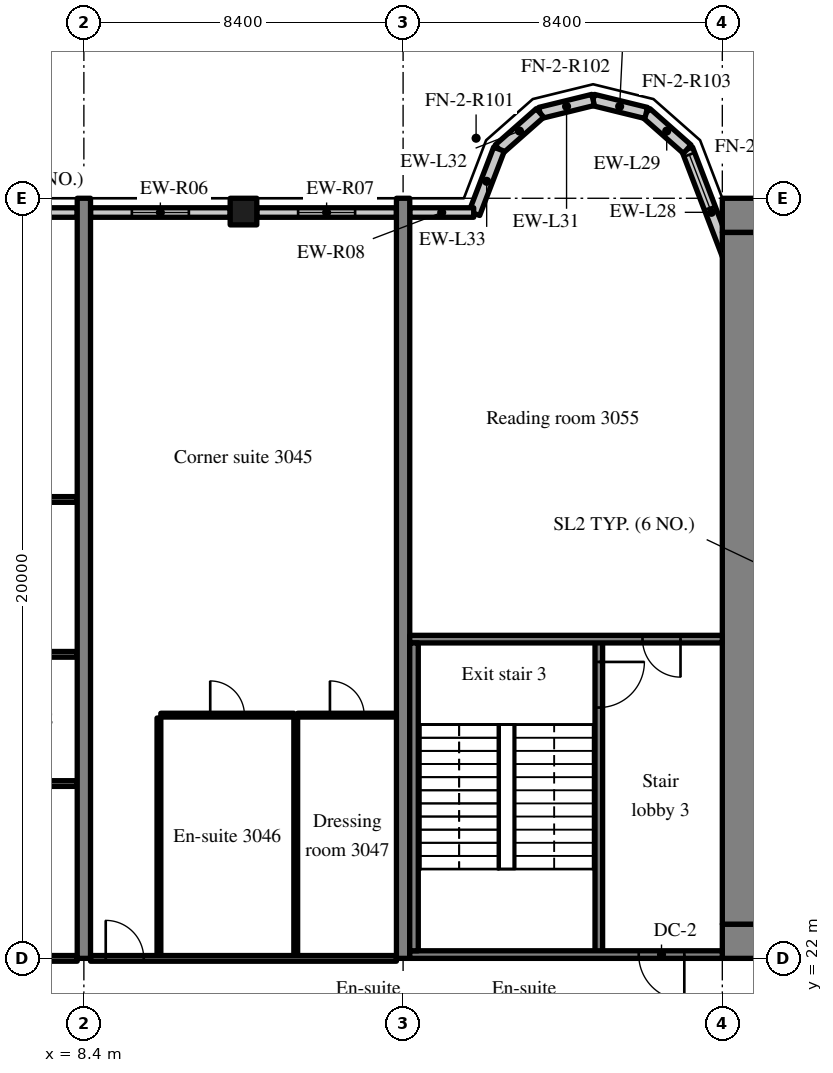
"""IFC4 building model, lengths in metres.
Left out: names, types, materials, properties, quantities, classifications, styles, units other than length and angle.
Written with IfcOpenShell. Run it as: python <this file> out.ifc"""

import sys

from ifc_helpers import new_model, si_unit, direction, frame, frame_2d, origin, origin_2d, place, context, subcontext, project, spatial, rectangle, extrude, source, transform, mapped, element, fill, save


model = new_model("IFC4")
c1 = context("Model", 3, precision=1e-05, world=origin(), true_north=direction((0.0, 1.0)))
c2 = subcontext(c1, "Body", "Model", "MODEL_VIEW")
j1 = project(units=[si_unit("LENGTHUNIT", "METRE"), si_unit("PLANEANGLEUNIT", "RADIAN")], contexts=[c1])
p1 = place(None, origin())
s1 = spatial("IfcSite", under=j1, at=p1, CompositionType="ELEMENT")
p2 = place(p1, origin())
s2 = spatial("IfcBuilding", under=s1, at=p2, CompositionType="ELEMENT")
p3 = place(p2, frame((0.0, 0.0, 125.6)))
s3 = spatial("IfcBuildingStorey", under=s2, at=p3, CompositionType="ELEMENT", Elevation=125.6)
m1 = source(origin(), c2, "Body", "SweptSolid", [
    extrude(rectangle(XDim=50.4, YDim=0.9, at=frame_2d((25.2, 0.0))), origin(), (0.0, 0.0, 1.0), 3.52),
])
p4 = place(p3, frame((25.2, 22.45, 0.0), z_axis=(0.0, 0.0, 1.0), x_axis=(1.0, 0.0, 0.0)))
e1 = element("IfcWall", 1, at=p4, inside=s3, PredefinedType="SHEAR", context=c2, shape_type="MappedRepresentation", body=[
    mapped(m1, transform((0.0, 0.0, 0.0), scale=1.0)),
])
m2 = source(origin(), c2, "Body", "SweptSolid", [
    extrude(rectangle(XDim=1.8, YDim=2.1, at=frame_2d((0.9, 1.05))), frame((0.0, 0.46, 0.0), z_axis=(0.0, -1.0, 0.0), x_axis=(1.0, 0.0, 0.0)), (0.0, 0.0, 1.0), 0.92),
])
p5 = place(p4, frame((15.9, 0.0, 0.0)))
e2 = element("IfcOpeningElement", 2, at=p5, cuts=e1, PredefinedType="OPENING", context=c2, shape_type="MappedRepresentation", body=[
    mapped(m2, transform((0.0, 0.0, 0.0), scale=1.0)),
])
m3 = source(origin(), c2, "Body", "SweptSolid", [
    extrude(rectangle(XDim=1.2, YDim=2.1, at=frame_2d((0.6, 1.05))), frame((0.0, 0.46, 0.0), z_axis=(0.0, -1.0, 0.0), x_axis=(1.0, 0.0, 0.0)), (0.0, 0.0, 1.0), 0.92),
])
p6 = place(p4, frame((26.975, 0.0, 0.0)))
e3 = element("IfcOpeningElement", 3, at=p6, cuts=e1, PredefinedType="OPENING", context=c2, shape_type="MappedRepresentation", body=[
    mapped(m3, transform((0.0, 0.0, 0.0), scale=1.0)),
])
m4 = source(origin(), c2, "Body", "SweptSolid", [
    extrude(rectangle(XDim=0.9, YDim=2.1, at=frame_2d((0.45, 1.05))), frame((0.0, 0.46, 0.0), z_axis=(0.0, -1.0, 0.0), x_axis=(1.0, 0.0, 0.0)), (0.0, 0.0, 1.0), 0.92),
])
p7 = place(p4, frame((33.75, 0.0, 0.0)))
e4 = element("IfcOpeningElement", 4, at=p7, cuts=e1, PredefinedType="OPENING", context=c2, shape_type="MappedRepresentation", body=[
    mapped(m4, transform((0.0, 0.0, 0.0), scale=1.0)),
])
p8 = place(p4, frame((30.75, 0.0, 0.0)))
e5 = element("IfcOpeningElement", 5, at=p8, cuts=e1, PredefinedType="OPENING", context=c2, shape_type="MappedRepresentation", body=[
    mapped(m4, transform((0.0, 0.0, 0.0), scale=1.0)),
])
p9 = place(p4, frame((38.275, 0.0, 0.0)))
e6 = element("IfcOpeningElement", 6, at=p9, cuts=e1, PredefinedType="OPENING", context=c2, shape_type="MappedRepresentation", body=[
    mapped(m4, transform((0.0, 0.0, 0.0), scale=1.0)),
])
p10 = place(p4, frame((6.45, 0.0, 0.0)))
e7 = element("IfcOpeningElement", 7, at=p10, cuts=e1, PredefinedType="OPENING", context=c2, shape_type="MappedRepresentation", body=[
    mapped(m3, transform((0.0, 0.0, 0.0), scale=1.0)),
])
p11 = place(p4, frame((47.775, 0.0, 0.0)))
e8 = element("IfcOpeningElement", 8, at=p11, cuts=e1, PredefinedType="OPENING", context=c2, shape_type="MappedRepresentation", body=[
    mapped(m3, transform((0.0, 0.0, 0.0), scale=1.0)),
])
p12 = place(p3, frame((25.2, 41.55, 0.0), z_axis=(0.0, 0.0, 1.0), x_axis=(1.0, 0.0, 0.0)))
e9 = element("IfcWall", 9, at=p12, inside=s3, PredefinedType="SHEAR", context=c2, shape_type="MappedRepresentation", body=[
    mapped(m1, transform((0.0, 0.0, 0.0), scale=1.0)),
])
m5 = source(origin(), c2, "Body", "SweptSolid", [
    extrude(rectangle(XDim=18.2, YDim=0.9, at=frame_2d((9.1, 0.0))), origin(), (0.0, 0.0, 1.0), 3.52),
])
p13 = place(p3, frame((25.65, 22.9, 0.0), z_axis=(0.0, 0.0, 1.0), x_axis=(0.0, 1.0, 0.0)))
e10 = element("IfcWall", 10, at=p13, inside=s3, PredefinedType="SHEAR", context=c2, shape_type="MappedRepresentation", body=[
    mapped(m5, transform((0.0, 0.0, 0.0), scale=1.0)),
])
m6 = source(origin(), c2, "Body", "SweptSolid", [
    extrude(rectangle(XDim=20.0, YDim=0.35, at=frame_2d((10.0, 0.0))), origin(), (0.0, 0.0, 1.0), 3.52),
])
for number, where, z_axis, x_axis in (
    (11, (8.4, 22.0, 0.0), (0.0, 0.0, 1.0), (0.0, 1.0, 0.0)),
    (12, (16.8, 22.0, 0.0), (0.0, 0.0, 1.0), (0.0, 1.0, 0.0)),
):
    element("IfcWall", number, at=place(p3, frame(where, z_axis=z_axis, x_axis=x_axis)), inside=s3, PredefinedType="SHEAR", context=c2, shape_type="MappedRepresentation", body=[
        mapped(m6, transform((0.0, 0.0, 0.0), scale=1.0)),
    ])
m7 = source(origin(), c2, "Body", "SweptSolid", [
    extrude(rectangle(XDim=0.7, YDim=0.7, at=origin_2d()), origin(), (0.0, 0.0, 1.0), 3.52),
])
p14 = place(p3, frame((12.6, 41.65, 0.0), z_axis=(0.0, 0.0, 1.0), x_axis=(1.0, 0.0, 0.0)))
e13 = element("IfcColumn", 13, at=p14, inside=s3, PredefinedType="COLUMN", context=c2, shape_type="MappedRepresentation", body=[
    mapped(m7, transform((0.0, 0.0, 0.0), scale=1.0)),
])
m8 = source(origin(), c2, "Body", "SweptSolid", [
    extrude(rectangle(XDim=3.559, YDim=0.3, at=frame_2d((1.78, 0.0))), origin(), (0.0, 0.0, 1.0), 3.52),
])
p15 = place(p3, frame((25.55, 39.969, 0.0), z_axis=(0.0, 0.0, 1.0), x_axis=(-0.35779745313, 0.933799219604, 0.0)))
e14 = element("IfcWall", 14, at=p15, inside=s3, PredefinedType="SOLIDWALL", context=c2, shape_type="MappedRepresentation", body=[
    mapped(m8, transform((0.0, 0.0, 0.0), scale=1.0)),
])
m9 = source(origin(), c2, "Body", "SweptSolid", [
    extrude(rectangle(XDim=1.5, YDim=2.0, at=frame_2d((0.75, 1.0))), frame((0.0, 0.16, 0.0), z_axis=(0.0, -1.0, 0.0), x_axis=(1.0, 0.0, 0.0)), (0.0, 0.0, 1.0), 0.32),
])
p16 = place(p15, frame((1.903, 0.0, 0.9)))
e15 = element("IfcOpeningElement", 15, at=p16, cuts=e14, PredefinedType="OPENING", context=c2, shape_type="MappedRepresentation", body=[
    mapped(m9, transform((0.0, 0.0, 0.0), scale=1.0)),
])
m10 = source(origin(), c2, "Body", "SweptSolid", [
    extrude(rectangle(XDim=1.44, YDim=0.3, at=frame_2d((0.72, 0.0))), origin(), (0.0, 0.0, 1.0), 3.52),
])
p17 = place(p3, frame((24.277, 43.292, 0.0), z_axis=(0.0, 0.0, 1.0), x_axis=(-0.749649827867, 0.661834673902, 0.0)))
e16 = element("IfcWall", 16, at=p17, inside=s3, PredefinedType="SOLIDWALL", context=c2, shape_type="MappedRepresentation", body=[
    mapped(m10, transform((0.0, 0.0, 0.0), scale=1.0)),
])
m11 = source(origin(), c2, "Body", "SweptSolid", [
    extrude(rectangle(XDim=1.438, YDim=0.3, at=frame_2d((0.719, 0.0))), origin(), (0.0, 0.0, 1.0), 3.52),
])
p18 = place(p3, frame((23.197, 44.245, 0.0), z_axis=(0.0, 0.0, 1.0), x_axis=(-0.971152283879, 0.238460146601, 0.0)))
e17 = element("IfcWall", 17, at=p18, inside=s3, PredefinedType="SOLIDWALL", context=c2, shape_type="MappedRepresentation", body=[
    mapped(m11, transform((0.0, 0.0, 0.0), scale=1.0)),
])
m12 = source(origin(), c2, "Body", "SweptSolid", [
    extrude(rectangle(XDim=1.439, YDim=0.3, at=frame_2d((0.719, 0.0))), origin(), (0.0, 0.0, 1.0), 3.52),
])
p19 = place(p3, frame((21.8, 44.588, 0.0), z_axis=(0.0, 0.0, 1.0), x_axis=(-0.971161932466, -0.238420848351, 0.0)))
e18 = element("IfcWall", 18, at=p19, inside=s3, PredefinedType="SOLIDWALL", context=c2, shape_type="MappedRepresentation", body=[
    mapped(m12, transform((0.0, 0.0, 0.0), scale=1.0)),
])
m13 = source(origin(), c2, "Body", "SweptSolid", [
    extrude(rectangle(XDim=1.44, YDim=0.3, at=frame_2d((0.72, 0.0))), origin(), (0.0, 0.0, 1.0), 3.52),
])
p20 = place(p3, frame((20.403, 44.245, 0.0), z_axis=(0.0, 0.0, 1.0), x_axis=(-0.74957555648, -0.661918790432, 0.0)))
e19 = element("IfcWall", 19, at=p20, inside=s3, PredefinedType="SOLIDWALL", context=c2, shape_type="MappedRepresentation", body=[
    mapped(m13, transform((0.0, 0.0, 0.0), scale=1.0)),
])
m14 = source(origin(), c2, "Body", "SweptSolid", [
    extrude(rectangle(XDim=1.812, YDim=0.3, at=frame_2d((0.906, 0.0))), origin(), (0.0, 0.0, 1.0), 3.52),
])
p21 = place(p3, frame((19.323, 43.292, 0.0), z_axis=(0.0, 0.0, 1.0), x_axis=(-0.357877270961, -0.93376863244, 0.0)))
e20 = element("IfcWall", 20, at=p21, inside=s3, PredefinedType="SOLIDWALL", context=c2, shape_type="MappedRepresentation", body=[
    mapped(m14, transform((0.0, 0.0, 0.0), scale=1.0)),
])
m15 = source(origin(), c2, "Body", "SweptSolid", [
    extrude(rectangle(XDim=4.07, YDim=0.25, at=frame_2d((2.035, 0.0))), origin(), (0.0, 0.0, 1.0), 2.82),
])
p22 = place(p3, frame((8.225, 41.625, 0.0), z_axis=(0.0, 0.0, 1.0), x_axis=(-1.0, 0.0, 0.0)))
e21 = element("IfcWall", 21, at=p22, inside=s3, PredefinedType="SOLIDWALL", context=c2, shape_type="MappedRepresentation", body=[
    mapped(m15, transform((0.0, 0.0, 0.0), scale=1.0)),
])
m16 = source(origin(), c2, "Body", "SweptSolid", [
    extrude(rectangle(XDim=1.5, YDim=1.5, at=frame_2d((0.75, 0.75))), frame((0.0, 0.135, 0.0), z_axis=(0.0, -1.0, 0.0), x_axis=(1.0, 0.0, 0.0)), (0.0, 0.0, 1.0), 0.27),
])
p23 = place(p22, frame((1.285, 0.0, 0.9)))
e22 = element("IfcOpeningElement", 22, at=p23, cuts=e21, PredefinedType="OPENING", context=c2, shape_type="MappedRepresentation", body=[
    mapped(m16, transform((0.0, 0.0, 0.0), scale=1.0)),
])
m17 = source(origin(), c2, "Body", "SweptSolid", [
    extrude(rectangle(XDim=3.675, YDim=0.25, at=frame_2d((1.837, 0.0))), origin(), (0.0, 0.0, 1.0), 2.82),
])
p24 = place(p3, frame((12.25, 41.625, 0.0), z_axis=(0.0, 0.0, 1.0), x_axis=(-1.0, 0.0, 0.0)))
e23 = element("IfcWall", 23, at=p24, inside=s3, PredefinedType="SOLIDWALL", context=c2, shape_type="MappedRepresentation", body=[
    mapped(m17, transform((0.0, 0.0, 0.0), scale=1.0)),
])
p25 = place(p24, frame((1.087, 0.0, 0.9)))
e24 = element("IfcOpeningElement", 24, at=p25, cuts=e23, PredefinedType="OPENING", context=c2, shape_type="MappedRepresentation", body=[
    mapped(m16, transform((0.0, 0.0, 0.0), scale=1.0)),
])
p26 = place(p3, frame((16.625, 41.625, 0.0), z_axis=(0.0, 0.0, 1.0), x_axis=(-1.0, 0.0, 0.0)))
e25 = element("IfcWall", 25, at=p26, inside=s3, PredefinedType="SOLIDWALL", context=c2, shape_type="MappedRepresentation", body=[
    mapped(m17, transform((0.0, 0.0, 0.0), scale=1.0)),
])
p27 = place(p26, frame((1.087, 0.0, 0.9)))
e26 = element("IfcOpeningElement", 26, at=p27, cuts=e25, PredefinedType="OPENING", context=c2, shape_type="MappedRepresentation", body=[
    mapped(m16, transform((0.0, 0.0, 0.0), scale=1.0)),
])
m18 = source(origin(), c2, "Body", "SweptSolid", [
    extrude(rectangle(XDim=1.683, YDim=0.25, at=frame_2d((0.841, 0.0))), origin(), (0.0, 0.0, 1.0), 2.82),
])
p28 = place(p3, frame((18.658, 41.625, 0.0), z_axis=(0.0, 0.0, 1.0), x_axis=(-1.0, 0.0, 0.0)))
e27 = element("IfcWall", 27, at=p28, inside=s3, PredefinedType="SOLIDWALL", context=c2, shape_type="MappedRepresentation", body=[
    mapped(m18, transform((0.0, 0.0, 0.0), scale=1.0)),
])
m19 = source(origin(), c2, "Body", "SweptSolid", [
    extrude(rectangle(XDim=8.3, YDim=0.2, at=frame_2d((4.15, 0.0))), origin(), (0.0, 0.0, 1.0), 3.52),
])
p29 = place(p3, frame((21.95, 22.1, 0.0), z_axis=(0.0, 0.0, 1.0), x_axis=(0.0, 1.0, 0.0)))
e28 = element("IfcWall", 28, at=p29, inside=s3, PredefinedType="SOLIDWALL", context=c2, shape_type="MappedRepresentation", body=[
    mapped(m19, transform((0.0, 0.0, 0.0), scale=1.0)),
])
m20 = source(origin(), c2, "Body", "SweptSolid", [
    extrude(rectangle(XDim=1.2, YDim=2.1, at=frame_2d((0.6, 1.05))), frame((0.0, 0.11, 0.0), z_axis=(0.0, -1.0, 0.0), x_axis=(1.0, 0.0, 0.0)), (0.0, 0.0, 1.0), 0.22),
])
p30 = place(p29, frame((6.5, 0.0, 0.0)))
e29 = element("IfcOpeningElement", 29, at=p30, cuts=e28, PredefinedType="OPENING", context=c2, shape_type="MappedRepresentation", body=[
    mapped(m20, transform((0.0, 0.0, 0.0), scale=1.0)),
])
m21 = source(origin(), c2, "Body", "SweptSolid", [
    extrude(rectangle(XDim=8.225, YDim=0.2, at=frame_2d((4.112, 0.0))), origin(), (0.0, 0.0, 1.0), 3.52),
])
p31 = place(p3, frame((16.975, 22.1, 0.0), z_axis=(0.0, 0.0, 1.0), x_axis=(1.0, 0.0, 0.0)))
e30 = element("IfcWall", 30, at=p31, inside=s3, PredefinedType="SOLIDWALL", context=c2, shape_type="MappedRepresentation", body=[
    mapped(m21, transform((0.0, 0.0, 0.0), scale=1.0)),
])
p32 = place(p31, frame((6.025, 0.0, 0.0)))
e31 = element("IfcOpeningElement", 31, at=p32, cuts=e30, PredefinedType="OPENING", context=c2, shape_type="MappedRepresentation", body=[
    mapped(m20, transform((0.0, 0.0, 0.0), scale=1.0)),
])
p33 = place(p3, frame((16.975, 30.4, 0.0), z_axis=(0.0, 0.0, 1.0), x_axis=(1.0, 0.0, 0.0)))
e32 = element("IfcWall", 32, at=p33, inside=s3, PredefinedType="SOLIDWALL", context=c2, shape_type="MappedRepresentation", body=[
    mapped(m21, transform((0.0, 0.0, 0.0), scale=1.0)),
])
m22 = source(origin(), c2, "Body", "SweptSolid", [
    extrude(rectangle(XDim=1.0, YDim=2.1, at=frame_2d((0.5, 1.05))), frame((0.0, 0.11, 0.0), z_axis=(0.0, -1.0, 0.0), x_axis=(1.0, 0.0, 0.0)), (0.0, 0.0, 1.0), 0.22),
])
p34 = place(p33, frame((6.125, 0.0, 0.0)))
e33 = element("IfcOpeningElement", 33, at=p34, cuts=e32, PredefinedType="OPENING", context=c2, shape_type="MappedRepresentation", body=[
    mapped(m22, transform((0.0, 0.0, 0.0), scale=1.0)),
])
m23 = source(origin(), c2, "Body", "SweptSolid", [
    extrude(rectangle(XDim=8.1, YDim=0.225, at=frame_2d((4.05, 0.0))), origin(), (0.0, 0.0, 1.0), 3.52),
])
p35 = place(p3, frame((17.087, 22.2, 0.0), z_axis=(0.0, 0.0, 1.0), x_axis=(0.0, 1.0, 0.0)))
e34 = element("IfcWall", 34, at=p35, inside=s3, PredefinedType="SOLIDWALL", context=c2, shape_type="MappedRepresentation", body=[
    mapped(m23, transform((0.0, 0.0, 0.0), scale=1.0)),
])
m24 = source(origin(), c2, "Body", "SweptSolid", [
    extrude(rectangle(XDim=5.325, YDim=0.15, at=frame_2d((2.663, 0.0))), origin(), (0.0, 0.0, 1.0), 2.82),
])
p36 = place(p3, frame((2.9, 22.0, 0.0), z_axis=(0.0, 0.0, 1.0), x_axis=(1.0, 0.0, 0.0)))
e35 = element("IfcWall", 35, at=p36, inside=s3, PredefinedType="PARTITIONING", context=c2, shape_type="MappedRepresentation", body=[
    mapped(m24, transform((0.0, 0.0, 0.0), scale=1.0)),
])
m25 = source(origin(), c2, "Body", "SweptSolid", [
    extrude(rectangle(XDim=5.325, YDim=0.15, at=frame_2d((2.663, 0.0))), origin(), (0.0, 0.0, 1.0), 3.52),
])
for number, where, z_axis, x_axis in (
    (36, (2.9, 26.6, 0.0), (0.0, 0.0, 1.0), (1.0, 0.0, 0.0)),
    (37, (2.9, 30.0, 0.0), (0.0, 0.0, 1.0), (1.0, 0.0, 0.0)),
):
    element("IfcWall", number, at=place(p3, frame(where, z_axis=z_axis, x_axis=x_axis)), inside=s3, PredefinedType="PARTITIONING", context=c2, shape_type="MappedRepresentation", body=[
        mapped(m25, transform((0.0, 0.0, 0.0), scale=1.0)),
    ])
m26 = source(origin(), c2, "Body", "SweptSolid", [
    extrude(rectangle(XDim=7.875, YDim=0.15, at=frame_2d((3.938, 0.0))), origin(), (0.0, 0.0, 1.0), 3.52),
])
p37 = place(p3, frame((0.35, 34.075, 0.0), z_axis=(0.0, 0.0, 1.0), x_axis=(1.0, 0.0, 0.0)))
e38 = element("IfcWall", 38, at=p37, inside=s3, PredefinedType="PARTITIONING", context=c2, shape_type="MappedRepresentation", body=[
    mapped(m26, transform((0.0, 0.0, 0.0), scale=1.0)),
])
m27 = source(origin(), c2, "Body", "SweptSolid", [
    extrude(rectangle(XDim=1.0, YDim=2.1, at=frame_2d((0.5, 1.05))), frame((0.0, 0.085, 0.0), z_axis=(0.0, -1.0, 0.0), x_axis=(1.0, 0.0, 0.0)), (0.0, 0.0, 1.0), 0.17),
])
p38 = place(p37, frame((0.7, 0.0, 0.0)))
e39 = element("IfcOpeningElement", 39, at=p38, cuts=e38, PredefinedType="OPENING", context=c2, shape_type="MappedRepresentation", body=[
    mapped(m27, transform((0.0, 0.0, 0.0), scale=1.0)),
])
m28 = source(origin(), c2, "Body", "SweptSolid", [
    extrude(rectangle(XDim=6.25, YDim=0.1, at=frame_2d((3.125, 0.0))), origin(), (0.0, 0.0, 1.0), 3.52),
])
for number, where, z_axis, x_axis in (
    (40, (10.375, 22.075, 0.0), (0.0, 0.0, 1.0), (0.0, 1.0, 0.0)),
    (41, (13.975, 22.075, 0.0), (0.0, 0.0, 1.0), (0.0, 1.0, 0.0)),
):
    element("IfcWall", number, at=place(p3, frame(where, z_axis=z_axis, x_axis=x_axis)), inside=s3, PredefinedType="PARTITIONING", context=c2, shape_type="MappedRepresentation", body=[
        mapped(m28, transform((0.0, 0.0, 0.0), scale=1.0)),
    ])
m29 = source(origin(), c2, "Body", "SweptSolid", [
    extrude(rectangle(XDim=3.5, YDim=0.1, at=frame_2d((1.75, 0.0))), origin(), (0.0, 0.0, 1.0), 3.52),
])
p39 = place(p3, frame((10.425, 28.4, 0.0), z_axis=(0.0, 0.0, 1.0), x_axis=(1.0, 0.0, 0.0)))
e42 = element("IfcWall", 42, at=p39, inside=s3, PredefinedType="PARTITIONING", context=c2, shape_type="MappedRepresentation", body=[
    mapped(m29, transform((0.0, 0.0, 0.0), scale=1.0)),
])
m30 = source(origin(), c2, "Body", "SweptSolid", [
    extrude(rectangle(XDim=0.9, YDim=2.1, at=frame_2d((0.45, 1.05))), frame((0.0, 0.06, 0.0), z_axis=(0.0, -1.0, 0.0), x_axis=(1.0, 0.0, 0.0)), (0.0, 0.0, 1.0), 0.12),
])
p40 = place(p39, frame((1.3, 0.0, 0.0)))
e43 = element("IfcOpeningElement", 43, at=p40, cuts=e42, PredefinedType="OPENING", context=c2, shape_type="MappedRepresentation", body=[
    mapped(m30, transform((0.0, 0.0, 0.0), scale=1.0)),
])
m31 = source(origin(), c2, "Body", "SweptSolid", [
    extrude(rectangle(XDim=2.6, YDim=0.1, at=frame_2d((1.3, 0.0))), origin(), (0.0, 0.0, 1.0), 3.52),
])
p41 = place(p3, frame((14.025, 28.4, 0.0), z_axis=(0.0, 0.0, 1.0), x_axis=(1.0, 0.0, 0.0)))
e44 = element("IfcWall", 44, at=p41, inside=s3, PredefinedType="PARTITIONING", context=c2, shape_type="MappedRepresentation", body=[
    mapped(m31, transform((0.0, 0.0, 0.0), scale=1.0)),
])
p42 = place(p41, frame((0.85, 0.0, 0.0)))
e45 = element("IfcOpeningElement", 45, at=p42, cuts=e44, PredefinedType="OPENING", context=c2, shape_type="MappedRepresentation", body=[
    mapped(m30, transform((0.0, 0.0, 0.0), scale=1.0)),
])
m32 = source(origin(), c2, "Body", "SweptSolid", [
    extrude(rectangle(XDim=8.05, YDim=0.15, at=frame_2d((4.025, 0.0))), origin(), (0.0, 0.0, 1.0), 2.82),
])
p43 = place(p3, frame((8.575, 22.0, 0.0), z_axis=(0.0, 0.0, 1.0), x_axis=(1.0, 0.0, 0.0)))
e46 = element("IfcWall", 46, at=p43, inside=s3, PredefinedType="PARTITIONING", context=c2, shape_type="MappedRepresentation", body=[
    mapped(m32, transform((0.0, 0.0, 0.0), scale=1.0)),
])
p44 = place(p43, frame((0.4, 0.0, 0.0)))
e47 = element("IfcOpeningElement", 47, at=p44, cuts=e46, PredefinedType="OPENING", context=c2, shape_type="MappedRepresentation", body=[
    mapped(m27, transform((0.0, 0.0, 0.0), scale=1.0)),
])
m33 = source(origin(), c2, "Body", "SweptSolid", [
    extrude(rectangle(XDim=1.5, YDim=2.0, at=frame_2d((0.75, 1.0))), frame((0.0, 0.03, 0.0), z_axis=(0.0, -1.0, 0.0), x_axis=(1.0, 0.0, 0.0)), (0.0, 0.0, 1.0), 0.06),
])
p45 = place(p16, origin())
e48 = element("IfcWindow", 48, at=p45, inside=s3, PartitioningType="SINGLE_PANEL", PredefinedType="WINDOW", context=c2, shape_type="MappedRepresentation", body=[
    mapped(m33, transform((0.0, 0.0, 0.0), scale=1.0)),
])
fill(e15, e48)
m34 = source(origin(), c2, "Body", "SweptSolid", [
    extrude(rectangle(XDim=1.5, YDim=1.5, at=frame_2d((0.75, 0.75))), frame((0.0, 0.03, 0.0), z_axis=(0.0, -1.0, 0.0), x_axis=(1.0, 0.0, 0.0)), (0.0, 0.0, 1.0), 0.06),
])
p46 = place(p25, origin())
e49 = element("IfcWindow", 49, at=p46, inside=s3, PartitioningType="SINGLE_PANEL", PredefinedType="WINDOW", context=c2, shape_type="MappedRepresentation", body=[
    mapped(m34, transform((0.0, 0.0, 0.0), scale=1.0)),
])
fill(e24, e49)
p47 = place(p27, origin())
e50 = element("IfcWindow", 50, at=p47, inside=s3, PartitioningType="SINGLE_PANEL", PredefinedType="WINDOW", context=c2, shape_type="MappedRepresentation", body=[
    mapped(m34, transform((0.0, 0.0, 0.0), scale=1.0)),
])
fill(e26, e50)
m35 = source(origin(), c2, "Body", "SweptSolid", [
    extrude(rectangle(XDim=1.2, YDim=2.1, at=frame_2d((0.6, 1.05))), frame((0.0, 0.025, 0.0), z_axis=(0.0, -1.0, 0.0), x_axis=(1.0, 0.0, 0.0)), (0.0, 0.0, 1.0), 0.05),
])
p48 = place(p30, origin())
e51 = element("IfcDoor", 51, at=p48, inside=s3, OperationType="SINGLE_SWING_RIGHT", PredefinedType="DOOR", context=c2, shape_type="MappedRepresentation", body=[
    mapped(m35, transform((0.0, 0.0, 0.0), scale=1.0)),
])
fill(e29, e51)
p49 = place(p32, origin())
e52 = element("IfcDoor", 52, at=p49, inside=s3, OperationType="SINGLE_SWING_RIGHT", PredefinedType="DOOR", context=c2, shape_type="MappedRepresentation", body=[
    mapped(m35, transform((0.0, 0.0, 0.0), scale=1.0)),
])
fill(e31, e52)
m36 = source(origin(), c2, "Body", "SweptSolid", [
    extrude(rectangle(XDim=1.0, YDim=2.1, at=frame_2d((0.5, 1.05))), frame((0.0, 0.025, 0.0), z_axis=(0.0, -1.0, 0.0), x_axis=(1.0, 0.0, 0.0)), (0.0, 0.0, 1.0), 0.05),
])
p50 = place(p34, origin())
e53 = element("IfcDoor", 53, at=p50, inside=s3, OperationType="SINGLE_SWING_RIGHT", PredefinedType="DOOR", context=c2, shape_type="MappedRepresentation", body=[
    mapped(m36, transform((0.0, 0.0, 0.0), scale=1.0)),
])
fill(e33, e53)
m37 = source(origin(), c2, "Body", "SweptSolid", [
    extrude(rectangle(XDim=0.9, YDim=2.1, at=frame_2d((0.45, 1.05))), frame((0.0, 0.025, 0.0), z_axis=(0.0, -1.0, 0.0), x_axis=(1.0, 0.0, 0.0)), (0.0, 0.0, 1.0), 0.05),
])
p51 = place(p40, origin())
e54 = element("IfcDoor", 54, at=p51, inside=s3, OperationType="SINGLE_SWING_LEFT", PredefinedType="DOOR", context=c2, shape_type="MappedRepresentation", body=[
    mapped(m37, transform((0.0, 0.0, 0.0), scale=1.0)),
])
fill(e43, e54)
p52 = place(p42, origin())
e55 = element("IfcDoor", 55, at=p52, inside=s3, OperationType="SINGLE_SWING_LEFT", PredefinedType="DOOR", context=c2, shape_type="MappedRepresentation", body=[
    mapped(m37, transform((0.0, 0.0, 0.0), scale=1.0)),
])
fill(e45, e55)
p53 = place(p44, origin())
e56 = element("IfcDoor", 56, at=p53, inside=s3, OperationType="SINGLE_SWING_LEFT", PredefinedType="DOOR", context=c2, shape_type="MappedRepresentation", body=[
    mapped(m36, transform((0.0, 0.0, 0.0), scale=1.0)),
])
fill(e47, e56)
save(model, sys.argv[1])
